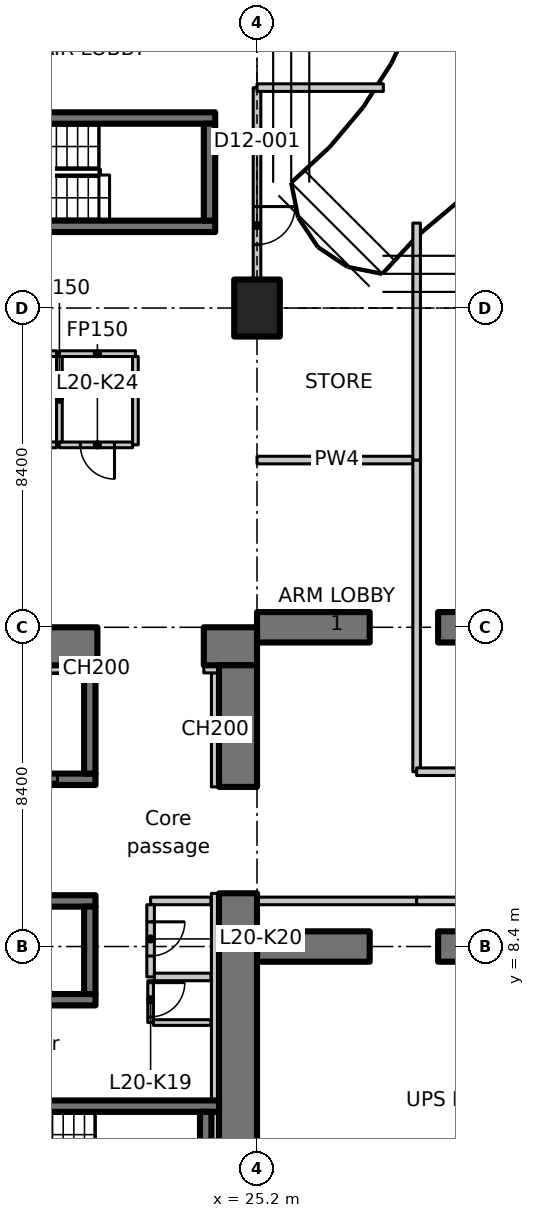
"""IFC4 building model, lengths in metres.
Left out: names, types, materials, properties, quantities, classifications, styles, units other than length and angle.
Written with IfcOpenShell. Run it as: python <this file> out.ifc"""

import sys

from ifc_helpers import new_model, si_unit, direction, frame, frame_2d, origin, origin_2d, place, context, subcontext, project, spatial, polyline, rectangle, outline, extrude, element, fill, save


model = new_model("IFC4")
c1 = context("Model", 3, precision=1e-05, world=origin(), true_north=direction((0.0, 1.0)))
c2 = subcontext(c1, "Body", "Model", "MODEL_VIEW")
j1 = project(units=[si_unit("LENGTHUNIT", "METRE"), si_unit("PLANEANGLEUNIT", "RADIAN")], contexts=[c1])
p1 = place(None, origin())
s1 = spatial("IfcSite", under=j1, at=p1, CompositionType="ELEMENT")
p2 = place(p1, origin())
s2 = spatial("IfcBuilding", under=s1, at=p2, CompositionType="ELEMENT")
p3 = place(p2, frame((0.0, 0.0, 86.9)))
s3 = spatial("IfcBuildingStorey", under=s2, at=p3, CompositionType="ELEMENT", Elevation=86.9)
p4 = place(p3, frame((25.2, 25.2, 0.0), z_axis=(0.0, 0.0, 1.0), x_axis=(1.0, 0.0, 0.0)))
e1 = element("IfcColumn", 1, at=p4, inside=s3, PredefinedType="COLUMN", context=c2, shape_type="SweptSolid", body=[
    extrude(rectangle(XDim=1.2, YDim=1.5, at=origin_2d()), origin(), (0.0, 0.0, 1.0), 4.55),
])
p5 = place(p3, frame((25.2, 8.4, 0.0), z_axis=(0.0, 0.0, 1.0), x_axis=(1.0, 0.0, 0.0)))
e2 = element("IfcWall", 2, at=p5, inside=s3, PredefinedType="SHEAR", context=c2, shape_type="SweptSolid", body=[
    extrude(rectangle(XDim=2.965, YDim=0.8, at=frame_2d((1.482, 0.0))), origin(), (0.0, 0.0, 1.0), 4.55),
])
p6 = place(p3, frame((29.965, 8.4, 0.0), z_axis=(0.0, 0.0, 1.0), x_axis=(1.0, 0.0, 0.0)))
e3 = element("IfcWall", 3, at=p6, inside=s3, PredefinedType="SHEAR", context=c2, shape_type="SweptSolid", body=[
    extrude(rectangle(XDim=2.965, YDim=0.8, at=frame_2d((1.482, 0.0))), origin(), (0.0, 0.0, 1.0), 4.55),
])
p7 = place(p3, frame((25.2, 16.8, 0.0), z_axis=(0.0, 0.0, 1.0), x_axis=(1.0, 0.0, 0.0)))
e4 = element("IfcWall", 4, at=p7, inside=s3, PredefinedType="SHEAR", context=c2, shape_type="SweptSolid", body=[
    extrude(rectangle(XDim=2.965, YDim=0.8, at=frame_2d((1.482, 0.0))), origin(), (0.0, 0.0, 1.0), 4.55),
])
p8 = place(p3, frame((29.965, 16.8, 0.0), z_axis=(0.0, 0.0, 1.0), x_axis=(1.0, 0.0, 0.0)))
e5 = element("IfcWall", 5, at=p8, inside=s3, PredefinedType="SHEAR", context=c2, shape_type="SweptSolid", body=[
    extrude(rectangle(XDim=2.965, YDim=0.8, at=frame_2d((1.482, 0.0))), origin(), (0.0, 0.0, 1.0), 4.55),
])
p9 = place(p3, frame((-1.1, 16.3, 0.0), z_axis=(0.0, 0.0, 1.0), x_axis=(1.0, 0.0, 0.0)))
e6 = element("IfcWall", 6, at=p9, inside=s3, PredefinedType="SHEAR", context=c2, shape_type="SweptSolid", body=[
    extrude(rectangle(XDim=22.1, YDim=1.0, at=frame_2d((11.05, 0.0))), origin(), (0.0, 0.0, 1.0), 4.55),
])
p10 = place(p9, frame((3.15, 0.0, 0.0)))
e7 = element("IfcOpeningElement", 7, at=p10, cuts=e6, PredefinedType="OPENING", context=c2, shape_type="SweptSolid", body=[
    extrude(rectangle(XDim=1.1, YDim=2.3, at=frame_2d((0.55, 1.15))), frame((0.0, 0.51, 0.0), z_axis=(0.0, -1.0, 0.0), x_axis=(1.0, 0.0, 0.0)), (0.0, 0.0, 1.0), 1.02),
])
p11 = place(p3, frame((23.8, 16.3, 0.0), z_axis=(0.0, 0.0, 1.0), x_axis=(1.0, 0.0, 0.0)))
e8 = element("IfcWall", 8, at=p11, inside=s3, PredefinedType="SHEAR", context=c2, shape_type="SweptSolid", body=[
    extrude(rectangle(XDim=1.4, YDim=1.0, at=frame_2d((0.7, 0.0))), origin(), (0.0, 0.0, 1.0), 4.55),
])
p12 = place(p3, frame((24.7, 1.0, 0.0), z_axis=(0.0, 0.0, 1.0), x_axis=(0.0, 1.0, 0.0)))
e9 = element("IfcWall", 9, at=p12, inside=s3, PredefinedType="SHEAR", context=c2, shape_type="SweptSolid", body=[
    extrude(rectangle(XDim=8.8, YDim=1.0, at=frame_2d((4.4, 0.0))), origin(), (0.0, 0.0, 1.0), 4.55),
])
p13 = place(p3, frame((24.7, 12.6, 0.0), z_axis=(0.0, 0.0, 1.0), x_axis=(0.0, 1.0, 0.0)))
e10 = element("IfcWall", 10, at=p13, inside=s3, PredefinedType="SHEAR", context=c2, shape_type="SweptSolid", body=[
    extrude(rectangle(XDim=3.2, YDim=1.0, at=frame_2d((1.6, 0.0))), origin(), (0.0, 0.0, 1.0), 4.55),
])
p14 = place(p3, frame((24.1, 12.6, 0.0), z_axis=(0.0, 0.0, 1.0), x_axis=(0.0, 1.0, 0.0)))
e11 = element("IfcWall", 11, at=p14, inside=s3, PredefinedType="PARTITIONING", context=c2, shape_type="SweptSolid", body=[
    extrude(rectangle(XDim=3.0, YDim=0.2, at=frame_2d((1.5, 0.0))), origin(), (0.0, 0.0, 1.0), 4.55),
])
p15 = place(p3, frame((23.8, 15.7, 0.0), z_axis=(0.0, 0.0, 1.0), x_axis=(1.0, 0.0, 0.0)))
e12 = element("IfcWall", 12, at=p15, inside=s3, PredefinedType="PARTITIONING", context=c2, shape_type="SweptSolid", body=[
    extrude(rectangle(XDim=0.4, YDim=0.2, at=frame_2d((0.2, 0.0))), origin(), (0.0, 0.0, 1.0), 4.55),
])
p16 = place(p3, frame((1.0, 7.0, 0.0), z_axis=(0.0, 0.0, 1.0), x_axis=(1.0, 0.0, 0.0)))
e13 = element("IfcWall", 13, at=p16, inside=s3, PredefinedType="SHEAR", context=c2, shape_type="SweptSolid", body=[
    extrude(rectangle(XDim=19.95, YDim=0.3, at=frame_2d((9.975, 0.0))), origin(), (0.0, 0.0, 1.0), 4.55),
])
p17 = place(p3, frame((1.0, 9.6, 0.0), z_axis=(0.0, 0.0, 1.0), x_axis=(1.0, 0.0, 0.0)))
e14 = element("IfcWall", 14, at=p17, inside=s3, PredefinedType="SHEAR", context=c2, shape_type="SweptSolid", body=[
    extrude(rectangle(XDim=19.95, YDim=0.3, at=frame_2d((9.975, 0.0))), origin(), (0.0, 0.0, 1.0), 4.55),
])
p18 = place(p17, frame((1.05, 0.0, 0.0)))
e15 = element("IfcOpeningElement", 15, at=p18, cuts=e14, PredefinedType="OPENING", context=c2, shape_type="SweptSolid", body=[
    extrude(rectangle(XDim=1.1, YDim=2.3, at=frame_2d((0.55, 1.15))), frame((0.0, 0.16, 0.0), z_axis=(0.0, -1.0, 0.0), x_axis=(1.0, 0.0, 0.0)), (0.0, 0.0, 1.0), 0.32),
])
p19 = place(p17, frame((3.85, 0.0, 0.0)))
e16 = element("IfcOpeningElement", 16, at=p19, cuts=e14, PredefinedType="OPENING", context=c2, shape_type="SweptSolid", body=[
    extrude(rectangle(XDim=1.1, YDim=2.3, at=frame_2d((0.55, 1.15))), frame((0.0, 0.16, 0.0), z_axis=(0.0, -1.0, 0.0), x_axis=(1.0, 0.0, 0.0)), (0.0, 0.0, 1.0), 0.32),
])
p20 = place(p17, frame((6.65, 0.0, 0.0)))
e17 = element("IfcOpeningElement", 17, at=p20, cuts=e14, PredefinedType="OPENING", context=c2, shape_type="SweptSolid", body=[
    extrude(rectangle(XDim=1.1, YDim=2.3, at=frame_2d((0.55, 1.15))), frame((0.0, 0.16, 0.0), z_axis=(0.0, -1.0, 0.0), x_axis=(1.0, 0.0, 0.0)), (0.0, 0.0, 1.0), 0.32),
])
p21 = place(p17, frame((9.45, 0.0, 0.0)))
e18 = element("IfcOpeningElement", 18, at=p21, cuts=e14, PredefinedType="OPENING", context=c2, shape_type="SweptSolid", body=[
    extrude(rectangle(XDim=1.1, YDim=2.3, at=frame_2d((0.55, 1.15))), frame((0.0, 0.16, 0.0), z_axis=(0.0, -1.0, 0.0), x_axis=(1.0, 0.0, 0.0)), (0.0, 0.0, 1.0), 0.32),
])
p22 = place(p17, frame((12.25, 0.0, 0.0)))
e19 = element("IfcOpeningElement", 19, at=p22, cuts=e14, PredefinedType="OPENING", context=c2, shape_type="SweptSolid", body=[
    extrude(rectangle(XDim=1.1, YDim=2.3, at=frame_2d((0.55, 1.15))), frame((0.0, 0.16, 0.0), z_axis=(0.0, -1.0, 0.0), x_axis=(1.0, 0.0, 0.0)), (0.0, 0.0, 1.0), 0.32),
])
p23 = place(p17, frame((15.05, 0.0, 0.0)))
e20 = element("IfcOpeningElement", 20, at=p23, cuts=e14, PredefinedType="OPENING", context=c2, shape_type="SweptSolid", body=[
    extrude(rectangle(XDim=1.1, YDim=2.3, at=frame_2d((0.55, 1.15))), frame((0.0, 0.16, 0.0), z_axis=(0.0, -1.0, 0.0), x_axis=(1.0, 0.0, 0.0)), (0.0, 0.0, 1.0), 0.32),
])
p24 = place(p3, frame((20.8, 7.15, 0.0), z_axis=(0.0, 0.0, 1.0), x_axis=(0.0, 1.0, 0.0)))
e21 = element("IfcWall", 21, at=p24, inside=s3, PredefinedType="SHEAR", context=c2, shape_type="SweptSolid", body=[
    extrude(rectangle(XDim=2.3, YDim=0.3, at=frame_2d((1.15, 0.0))), origin(), (0.0, 0.0, 1.0), 4.55),
])
p25 = place(p3, frame((15.05, 12.8, 0.0), z_axis=(0.0, 0.0, 1.0), x_axis=(1.0, 0.0, 0.0)))
e22 = element("IfcWall", 22, at=p25, inside=s3, PredefinedType="SHEAR", context=c2, shape_type="SweptSolid", body=[
    extrude(rectangle(XDim=5.9, YDim=0.3, at=frame_2d((2.95, 0.0))), origin(), (0.0, 0.0, 1.0), 4.55),
])
p26 = place(p25, frame((3.8, 0.0, 0.0)))
e23 = element("IfcOpeningElement", 23, at=p26, cuts=e22, PredefinedType="OPENING", context=c2, shape_type="SweptSolid", body=[
    extrude(rectangle(XDim=1.1, YDim=2.3, at=frame_2d((0.55, 1.15))), frame((0.0, 0.16, 0.0), z_axis=(0.0, -1.0, 0.0), x_axis=(1.0, 0.0, 0.0)), (0.0, 0.0, 1.0), 0.32),
])
p27 = place(p3, frame((20.8, 12.95, 0.0), z_axis=(0.0, 0.0, 1.0), x_axis=(0.0, 1.0, 0.0)))
e24 = element("IfcWall", 24, at=p27, inside=s3, PredefinedType="SHEAR", context=c2, shape_type="SweptSolid", body=[
    extrude(rectangle(XDim=2.85, YDim=0.3, at=frame_2d((1.425, 0.0))), origin(), (0.0, 0.0, 1.0), 4.55),
])
p28 = place(p3, frame((15.8, 4.2, 0.0), z_axis=(0.0, 0.0, 1.0), x_axis=(1.0, 0.0, 0.0)))
e25 = element("IfcWall", 25, at=p28, inside=s3, PredefinedType="SHEAR", context=c2, shape_type="SweptSolid", body=[
    extrude(rectangle(XDim=8.4, YDim=0.3, at=frame_2d((4.2, 0.0))), origin(), (0.0, 0.0, 1.0), 4.55),
])
p29 = place(p28, frame((0.4, 0.0, 0.0)))
e26 = element("IfcOpeningElement", 26, at=p29, cuts=e25, PredefinedType="OPENING", context=c2, shape_type="SweptSolid", body=[
    extrude(rectangle(XDim=1.0, YDim=2.1, at=frame_2d((0.5, 1.05))), frame((0.0, 0.16, 0.0), z_axis=(0.0, -1.0, 0.0), x_axis=(1.0, 0.0, 0.0)), (0.0, 0.0, 1.0), 0.32),
])
p30 = place(p3, frame((23.85, 1.5, 0.0), z_axis=(0.0, 0.0, 1.0), x_axis=(0.0, 1.0, 0.0)))
e27 = element("IfcWall", 27, at=p30, inside=s3, PredefinedType="SHEAR", context=c2, shape_type="SweptSolid", body=[
    extrude(rectangle(XDim=2.55, YDim=0.3, at=frame_2d((1.275, 0.0))), origin(), (0.0, 0.0, 1.0), 4.55),
])
for number, where, z_axis, x_axis in (
    (28, (15.9, 27.35, 0.0), (0.0, 0.0, 1.0), (1.0, 0.0, 0.0)),
    (29, (15.9, 30.2, 0.0), (0.0, 0.0, 1.0), (1.0, 0.0, 0.0)),
):
    element("IfcWall", number, at=place(p3, frame(where, z_axis=z_axis, x_axis=x_axis)), inside=s3, PredefinedType="SHEAR", context=c2, shape_type="SweptSolid", body=[
        extrude(rectangle(XDim=8.2, YDim=0.3, at=frame_2d((4.1, 0.0))), origin(), (0.0, 0.0, 1.0), 4.55),
    ])
p31 = place(p3, frame((23.95, 27.5, 0.0), z_axis=(0.0, 0.0, 1.0), x_axis=(0.0, 1.0, 0.0)))
e30 = element("IfcWall", 30, at=p31, inside=s3, PredefinedType="SHEAR", context=c2, shape_type="SweptSolid", body=[
    extrude(rectangle(XDim=2.55, YDim=0.3, at=frame_2d((1.275, 0.0))), origin(), (0.0, 0.0, 1.0), 4.55),
])
p32 = place(p3, frame((23.988, 9.6, 0.0), z_axis=(0.0, 0.0, 1.0), x_axis=(-1.0, 0.0, 0.0)))
e31 = element("IfcWall", 31, at=p32, inside=s3, PredefinedType="PARTITIONING", context=c2, shape_type="SweptSolid", body=[
    extrude(rectangle(XDim=1.588, YDim=0.2, at=frame_2d((0.794, 0.0))), origin(), (0.0, 0.0, 1.0), 4.55),
])
p33 = place(p3, frame((22.4, 9.5, 0.0), z_axis=(0.0, 0.0, 1.0), x_axis=(0.0, -1.0, 0.0)))
e32 = element("IfcWall", 32, at=p33, inside=s3, PredefinedType="PARTITIONING", context=c2, shape_type="SweptSolid", body=[
    extrude(rectangle(XDim=1.9, YDim=0.2, at=frame_2d((0.95, 0.0))), origin(), (0.0, 0.0, 1.0), 4.55),
])
p34 = place(p33, frame((0.45, 0.0, 0.0)))
e33 = element("IfcOpeningElement", 33, at=p34, cuts=e32, PredefinedType="OPENING", context=c2, shape_type="SweptSolid", body=[
    extrude(rectangle(XDim=0.9, YDim=2.1, at=frame_2d((0.45, 1.05))), frame((0.0, 0.11, 0.0), z_axis=(0.0, -1.0, 0.0), x_axis=(1.0, 0.0, 0.0)), (0.0, 0.0, 1.0), 0.22),
])
p35 = place(p3, frame((22.5, 7.6, 0.0), z_axis=(0.0, 0.0, 1.0), x_axis=(1.0, 0.0, 0.0)))
e34 = element("IfcWall", 34, at=p35, inside=s3, PredefinedType="PARTITIONING", context=c2, shape_type="SweptSolid", body=[
    extrude(rectangle(XDim=1.488, YDim=0.2, at=frame_2d((0.744, 0.0))), origin(), (0.0, 0.0, 1.0), 4.55),
])
p36 = place(p3, frame((20.0, 24.0, 0.0), z_axis=(0.0, 0.0, 1.0), x_axis=(1.0, 0.0, 0.0)))
e35 = element("IfcWall", 35, at=p36, inside=s3, PredefinedType="PARTITIONING", context=c2, shape_type="SweptSolid", body=[
    extrude(rectangle(XDim=2.0, YDim=0.15, at=frame_2d((1.0, 0.0))), origin(), (0.0, 0.0, 1.0), 4.55),
])
p37 = place(p3, frame((22.0, 23.925, 0.0), z_axis=(0.0, 0.0, 1.0), x_axis=(0.0, -1.0, 0.0)))
e36 = element("IfcWall", 36, at=p37, inside=s3, PredefinedType="PARTITIONING", context=c2, shape_type="SweptSolid", body=[
    extrude(rectangle(XDim=2.325, YDim=0.15, at=frame_2d((1.163, 0.0))), origin(), (0.0, 0.0, 1.0), 4.55),
])
p38 = place(p3, frame((21.925, 21.6, 0.0), z_axis=(0.0, 0.0, 1.0), x_axis=(-1.0, 0.0, 0.0)))
e37 = element("IfcWall", 37, at=p38, inside=s3, PredefinedType="PARTITIONING", context=c2, shape_type="SweptSolid", body=[
    extrude(rectangle(XDim=1.925, YDim=0.15, at=frame_2d((0.962, 0.0))), origin(), (0.0, 0.0, 1.0), 4.55),
])
p39 = place(p38, frame((0.475, 0.0, 0.0)))
e38 = element("IfcOpeningElement", 38, at=p39, cuts=e37, PredefinedType="OPENING", context=c2, shape_type="SweptSolid", body=[
    extrude(rectangle(XDim=0.9, YDim=2.1, at=frame_2d((0.45, 1.05))), frame((0.0, 0.085, 0.0), z_axis=(0.0, -1.0, 0.0), x_axis=(1.0, 0.0, 0.0)), (0.0, 0.0, 1.0), 0.17),
])
p40 = place(p3, frame((20.0, 21.675, 0.0), z_axis=(0.0, 0.0, 1.0), x_axis=(0.0, 1.0, 0.0)))
e39 = element("IfcWall", 39, at=p40, inside=s3, PredefinedType="PARTITIONING", context=c2, shape_type="SweptSolid", body=[
    extrude(rectangle(XDim=2.25, YDim=0.15, at=frame_2d((1.125, 0.0))), origin(), (0.0, 0.0, 1.0), 4.55),
])
p41 = place(p3, frame((19.925, 21.6, 0.0), z_axis=(0.0, 0.0, 1.0), x_axis=(-1.0, 0.0, 0.0)))
e40 = element("IfcWall", 40, at=p41, inside=s3, PredefinedType="PARTITIONING", context=c2, shape_type="SweptSolid", body=[
    extrude(rectangle(XDim=2.325, YDim=0.15, at=frame_2d((1.163, 0.0))), origin(), (0.0, 0.0, 1.0), 4.55),
])
p42 = place(p41, frame((0.675, 0.0, 0.0)))
e41 = element("IfcOpeningElement", 41, at=p42, cuts=e40, PredefinedType="OPENING", context=c2, shape_type="SweptSolid", body=[
    extrude(rectangle(XDim=0.9, YDim=2.1, at=frame_2d((0.45, 1.05))), frame((0.0, 0.085, 0.0), z_axis=(0.0, -1.0, 0.0), x_axis=(1.0, 0.0, 0.0)), (0.0, 0.0, 1.0), 0.17),
])
p43 = place(p3, frame((17.675, 24.0, 0.0), z_axis=(0.0, 0.0, 1.0), x_axis=(1.0, 0.0, 0.0)))
e42 = element("IfcWall", 42, at=p43, inside=s3, PredefinedType="PARTITIONING", context=c2, shape_type="SweptSolid", body=[
    extrude(rectangle(XDim=2.25, YDim=0.15, at=frame_2d((1.125, 0.0))), origin(), (0.0, 0.0, 1.0), 4.55),
])
p44 = place(p3, frame((22.4, 7.5, 0.0), z_axis=(0.0, 0.0, 1.0), x_axis=(0.0, -1.0, 0.0)))
e43 = element("IfcWall", 43, at=p44, inside=s3, PredefinedType="PARTITIONING", context=c2, shape_type="SweptSolid", body=[
    extrude(rectangle(XDim=1.1, YDim=0.15, at=frame_2d((0.55, 0.0))), origin(), (0.0, 0.0, 1.0), 4.55),
])
p45 = place(p44, frame((0.05, 0.0, 0.0)))
e44 = element("IfcOpeningElement", 44, at=p45, cuts=e43, PredefinedType="OPENING", context=c2, shape_type="SweptSolid", body=[
    extrude(rectangle(XDim=0.9, YDim=2.1, at=frame_2d((0.45, 1.05))), frame((0.0, 0.085, 0.0), z_axis=(0.0, -1.0, 0.0), x_axis=(1.0, 0.0, 0.0)), (0.0, 0.0, 1.0), 0.17),
])
p46 = place(p3, frame((22.475, 6.4, 0.0), z_axis=(0.0, 0.0, 1.0), x_axis=(1.0, 0.0, 0.0)))
e45 = element("IfcWall", 45, at=p46, inside=s3, PredefinedType="PARTITIONING", context=c2, shape_type="SweptSolid", body=[
    extrude(rectangle(XDim=1.513, YDim=0.15, at=frame_2d((0.756, 0.0))), origin(), (0.0, 0.0, 1.0), 4.55),
])
p47 = place(p3, frame((18.15, 15.7, 0.0), z_axis=(0.0, 0.0, 1.0), x_axis=(1.0, 0.0, 0.0)))
e46 = element("IfcWall", 46, at=p47, inside=s3, PredefinedType="PARTITIONING", context=c2, shape_type="SweptSolid", body=[
    extrude(rectangle(XDim=2.5, YDim=0.2, at=frame_2d((1.25, 0.0))), origin(), (0.0, 0.0, 1.0), 4.55),
])
p48 = place(p3, frame((20.95, 15.7, 0.0), z_axis=(0.0, 0.0, 1.0), x_axis=(1.0, 0.0, 0.0)))
e47 = element("IfcWall", 47, at=p48, inside=s3, PredefinedType="PARTITIONING", context=c2, shape_type="SweptSolid", body=[
    extrude(rectangle(XDim=0.05, YDim=0.2, at=frame_2d((0.025, 0.0))), origin(), (0.0, 0.0, 1.0), 4.55),
])
p49 = place(p3, frame((24.1, 1.5, 0.0), z_axis=(0.0, 0.0, 1.0), x_axis=(0.0, 1.0, 0.0)))
e48 = element("IfcWall", 48, at=p49, inside=s3, PredefinedType="PARTITIONING", context=c2, shape_type="SweptSolid", body=[
    extrude(rectangle(XDim=2.55, YDim=0.2, at=frame_2d((1.275, 0.0))), origin(), (0.0, 0.0, 1.0), 4.55),
])
p50 = place(p3, frame((24.1, 4.35, 0.0), z_axis=(0.0, 0.0, 1.0), x_axis=(0.0, 1.0, 0.0)))
e49 = element("IfcWall", 49, at=p50, inside=s3, PredefinedType="PARTITIONING", context=c2, shape_type="SweptSolid", body=[
    extrude(rectangle(XDim=5.45, YDim=0.2, at=frame_2d((2.725, 0.0))), origin(), (0.0, 0.0, 1.0), 4.55),
])
for number, where, z_axis, x_axis in (
    (50, (25.2, 21.2, 0.0), (0.0, 0.0, 1.0), (1.0, 0.0, 0.0)),
    (51, (29.4, 9.6, 0.0), (0.0, 0.0, 1.0), (-1.0, 0.0, 0.0)),
):
    element("IfcWall", number, at=place(p3, frame(where, z_axis=z_axis, x_axis=x_axis)), inside=s3, PredefinedType="PARTITIONING", context=c2, shape_type="SweptSolid", body=[
        extrude(rectangle(XDim=4.2, YDim=0.2, at=frame_2d((2.1, 0.0))), origin(), (0.0, 0.0, 1.0), 4.53),
    ])
p51 = place(p3, frame((29.4, 21.2, 0.0), z_axis=(0.0, 0.0, 1.0), x_axis=(0.0, -1.0, 0.0)))
e52 = element("IfcWall", 52, at=p51, inside=s3, PredefinedType="PARTITIONING", context=c2, shape_type="SweptSolid", body=[
    extrude(rectangle(XDim=8.2, YDim=0.2, at=frame_2d((4.1, 0.0))), origin(), (0.0, 0.0, 1.0), 4.53),
])
p52 = place(p3, frame((29.4, 27.436, 0.0), z_axis=(0.0, 0.0, 1.0), x_axis=(0.0, -1.0, 0.0)))
e53 = element("IfcWall", 53, at=p52, inside=s3, PredefinedType="PARTITIONING", context=c2, shape_type="SweptSolid", body=[
    extrude(outline(polyline([(0.0, 0.0), (6.236, 0.0), (6.236, 4.53), (2.686, 4.53), (2.684, 4.18), (1.788, 4.18), (1.786, 4.53), (0.161, 4.53), (0.0, 4.53), (0.0, 0.0)])), frame((0.0, 0.1, 0.0), z_axis=(0.0, -1.0, 0.0), x_axis=(1.0, 0.0, 0.0)), (0.0, 0.0, 1.0), 0.2),
])
p53 = place(p3, frame((25.2, 31.0, 0.0), z_axis=(0.0, 0.0, 1.0), x_axis=(0.0, -1.0, 0.0)))
e54 = element("IfcWall", 54, at=p53, inside=s3, PredefinedType="PARTITIONING", context=c2, shape_type="SweptSolid", body=[
    extrude(outline(polyline([(0.0, 0.0), (5.03, 0.0), (5.03, 4.18), (0.0, 4.18), (0.0, 0.0)])), frame((0.0, 0.1, 0.0), z_axis=(0.0, -1.0, 0.0), x_axis=(1.0, 0.0, 0.0)), (0.0, 0.0, 1.0), 0.2),
])
p54 = place(p53, frame((3.13, 0.0, 0.0)))
e55 = element("IfcOpeningElement", 55, at=p54, cuts=e54, PredefinedType="OPENING", context=c2, shape_type="SweptSolid", body=[
    extrude(rectangle(XDim=1.0, YDim=2.1, at=frame_2d((0.5, 1.05))), frame((0.0, 0.11, 0.0), z_axis=(0.0, -1.0, 0.0), x_axis=(1.0, 0.0, 0.0)), (0.0, 0.0, 1.0), 0.22),
])
p55 = place(p3, frame((25.2, 31.0, 0.0), z_axis=(0.0, 0.0, 1.0), x_axis=(1.0, 0.0, 0.0)))
e56 = element("IfcWall", 56, at=p55, inside=s3, PredefinedType="PARTITIONING", context=c2, shape_type="SweptSolid", body=[
    extrude(rectangle(XDim=3.324, YDim=0.2, at=frame_2d((1.662, 0.0))), origin(), (0.0, 0.0, 1.0), 4.18),
])
p56 = place(p3, frame((37.8, 9.6, 0.0), z_axis=(0.0, 0.0, 1.0), x_axis=(-1.0, 0.0, 0.0)))
e57 = element("IfcWall", 57, at=p56, inside=s3, PredefinedType="PARTITIONING", context=c2, shape_type="SweptSolid", body=[
    extrude(rectangle(XDim=8.4, YDim=0.2, at=frame_2d((4.2, 0.0))), origin(), (0.0, 0.0, 1.0), 4.53),
])
p57 = place(p56, frame((1.5, 0.0, 0.0)))
e58 = element("IfcOpeningElement", 58, at=p57, cuts=e57, PredefinedType="OPENING", context=c2, shape_type="SweptSolid", body=[
    extrude(rectangle(XDim=1.8, YDim=2.1, at=frame_2d((0.9, 1.05))), frame((0.0, 0.11, 0.0), z_axis=(0.0, -1.0, 0.0), x_axis=(1.0, 0.0, 0.0)), (0.0, 0.0, 1.0), 0.22),
])
p58 = place(p3, frame((29.4, 13.0, 0.0), z_axis=(0.0, 0.0, 1.0), x_axis=(1.0, 0.0, 0.0)))
e59 = element("IfcWall", 59, at=p58, inside=s3, PredefinedType="PARTITIONING", context=c2, shape_type="SweptSolid", body=[
    extrude(rectangle(XDim=8.4, YDim=0.2, at=frame_2d((4.2, 0.0))), origin(), (0.0, 0.0, 1.0), 4.53),
])
p59 = place(p58, frame((3.3, 0.0, 0.0)))
e60 = element("IfcOpeningElement", 60, at=p59, cuts=e59, PredefinedType="OPENING", context=c2, shape_type="SweptSolid", body=[
    extrude(rectangle(XDim=1.8, YDim=2.1, at=frame_2d((0.9, 1.05))), frame((0.0, 0.11, 0.0), z_axis=(0.0, -1.0, 0.0), x_axis=(1.0, 0.0, 0.0)), (0.0, 0.0, 1.0), 0.22),
])
p60 = place(p26, origin())
e61 = element("IfcDoor", 61, at=p60, inside=s3, OperationType="SLIDING_TO_LEFT", PredefinedType="DOOR", context=c2, shape_type="SweptSolid", body=[
    extrude(rectangle(XDim=1.1, YDim=2.3, at=frame_2d((0.55, 1.15))), frame((0.0, 0.025, 0.0), z_axis=(0.0, -1.0, 0.0), x_axis=(1.0, 0.0, 0.0)), (0.0, 0.0, 1.0), 0.05),
])
fill(e23, e61)
p61 = place(p45, origin())
e62 = element("IfcDoor", 62, at=p61, inside=s3, OperationType="SINGLE_SWING_LEFT", PredefinedType="DOOR", context=c2, shape_type="SweptSolid", body=[
    extrude(rectangle(XDim=0.9, YDim=2.1, at=frame_2d((0.45, 1.05))), frame((0.0, 0.025, 0.0), z_axis=(0.0, -1.0, 0.0), x_axis=(1.0, 0.0, 0.0)), (0.0, 0.0, 1.0), 0.05),
])
fill(e44, e62)
p62 = place(p34, origin())
e63 = element("IfcDoor", 63, at=p62, inside=s3, OperationType="SINGLE_SWING_RIGHT", PredefinedType="DOOR", context=c2, shape_type="SweptSolid", body=[
    extrude(rectangle(XDim=0.9, YDim=2.1, at=frame_2d((0.45, 1.05))), frame((0.0, 0.025, 0.0), z_axis=(0.0, -1.0, 0.0), x_axis=(1.0, 0.0, 0.0)), (0.0, 0.0, 1.0), 0.05),
])
fill(e33, e63)
p63 = place(p39, origin())
e64 = element("IfcDoor", 64, at=p63, inside=s3, OperationType="SINGLE_SWING_RIGHT", PredefinedType="DOOR", context=c2, shape_type="SweptSolid", body=[
    extrude(rectangle(XDim=0.9, YDim=2.1, at=frame_2d((0.45, 1.05))), frame((0.0, 0.025, 0.0), z_axis=(0.0, -1.0, 0.0), x_axis=(1.0, 0.0, 0.0)), (0.0, 0.0, 1.0), 0.05),
])
fill(e38, e64)
p64 = place(p54, origin())
e65 = element("IfcDoor", 65, at=p64, inside=s3, OperationType="SINGLE_SWING_RIGHT", PredefinedType="DOOR", context=c2, shape_type="SweptSolid", body=[
    extrude(rectangle(XDim=1.0, YDim=2.1, at=frame_2d((0.5, 1.05))), frame((0.0, 0.025, 0.0), z_axis=(0.0, -1.0, 0.0), x_axis=(1.0, 0.0, 0.0)), (0.0, 0.0, 1.0), 0.05),
])
fill(e55, e65)
save(model, sys.argv[1])
